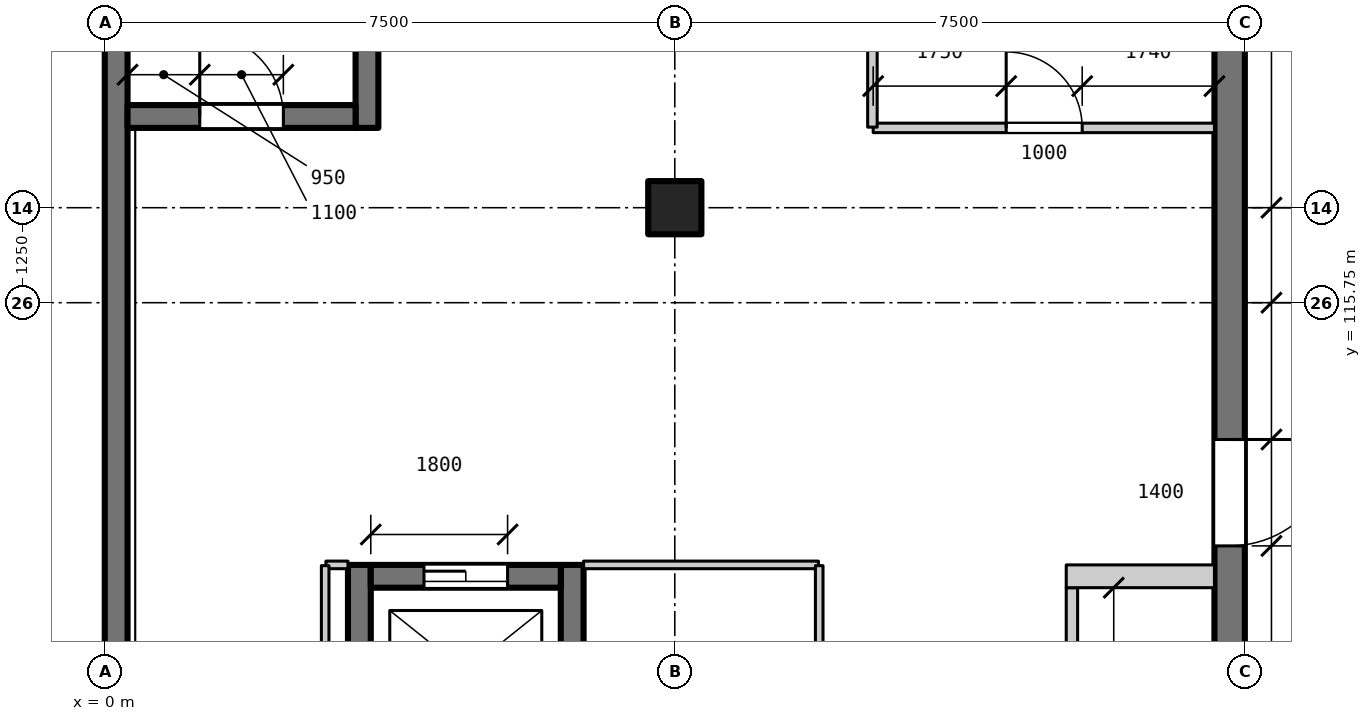
"""IFC4 building model, lengths in metres.
Left out: names, types, materials, properties, quantities, classifications, styles, units other than length and angle.
Written with IfcOpenShell. Run it as: python <this file> out.ifc"""

import sys

from ifc_helpers import new_model, si_unit, direction, frame, frame_2d, origin, origin_2d, place, context, subcontext, project, spatial, rectangle, extrude, element, fill, save


model = new_model("IFC4")
c1 = context("Model", 3, precision=1e-05, world=origin(), true_north=direction((0.0, 1.0)))
c2 = subcontext(c1, "Body", "Model", "MODEL_VIEW")
j1 = project(units=[si_unit("LENGTHUNIT", "METRE"), si_unit("PLANEANGLEUNIT", "RADIAN")], contexts=[c1])
p1 = place(None, origin())
s1 = spatial("IfcSite", under=j1, at=p1, CompositionType="ELEMENT")
p2 = place(p1, origin())
s2 = spatial("IfcBuilding", under=s1, at=p2, CompositionType="ELEMENT")
p3 = place(p2, origin())
s3 = spatial("IfcBuildingStorey", under=s2, at=p3, CompositionType="ELEMENT", Elevation=0.0)
p4 = place(p3, frame((7.5, 117.0, 0.0), z_axis=(0.0, 0.0, 1.0), x_axis=(1.0, 0.0, 0.0)))
e1 = element("IfcColumn", 1, at=p4, inside=s3, PredefinedType="COLUMN", context=c2, shape_type="SweptSolid", body=[
    extrude(rectangle(XDim=0.7, YDim=0.7, at=origin_2d()), origin(), (0.0, 0.0, 1.0), 6.0),
])
p5 = place(p3, frame((0.15, 18.0, 0.0), z_axis=(0.0, 0.0, 1.0), x_axis=(0.0, 1.0, 0.0)))
e2 = element("IfcWall", 2, at=p5, inside=s3, PredefinedType="SHEAR", context=c2, shape_type="SweptSolid", body=[
    extrude(rectangle(XDim=108.0, YDim=0.3, at=frame_2d((54.0, 0.0))), origin(), (0.0, 0.0, 1.0), 6.0),
])
p6 = place(p3, frame((14.8, 99.0, 0.0), z_axis=(0.0, 0.0, 1.0), x_axis=(0.0, 1.0, 0.0)))
e3 = element("IfcWall", 3, at=p6, inside=s3, PredefinedType="SHEAR", context=c2, shape_type="SweptSolid", body=[
    extrude(rectangle(XDim=26.55, YDim=0.4, at=frame_2d((13.275, 0.0))), origin(), (0.0, 0.0, 1.0), 6.0),
])
p7 = place(p6, frame((13.55, 0.0, 0.0)))
e4 = element("IfcOpeningElement", 4, at=p7, cuts=e3, PredefinedType="OPENING", context=c2, shape_type="SweptSolid", body=[
    extrude(rectangle(XDim=1.4, YDim=2.4, at=frame_2d((0.7, 1.2))), frame((0.0, 0.21, 0.0), z_axis=(0.0, -1.0, 0.0), x_axis=(1.0, 0.0, 0.0)), (0.0, 0.0, 1.0), 0.42),
])
p8 = place(p3, frame((3.45, 118.05, 0.0), z_axis=(0.0, 0.0, 1.0), x_axis=(0.0, 1.0, 0.0)))
e5 = element("IfcWall", 5, at=p8, inside=s3, PredefinedType="SHEAR", context=c2, shape_type="SweptSolid", body=[
    extrude(rectangle(XDim=7.5, YDim=0.3, at=frame_2d((3.75, 0.0))), origin(), (0.0, 0.0, 1.0), 6.0),
])
p9 = place(p3, frame((0.3, 118.2, 0.0), z_axis=(0.0, 0.0, 1.0), x_axis=(1.0, 0.0, 0.0)))
e6 = element("IfcWall", 6, at=p9, inside=s3, PredefinedType="SHEAR", context=c2, shape_type="SweptSolid", body=[
    extrude(rectangle(XDim=3.0, YDim=0.3, at=frame_2d((1.5, 0.0))), origin(), (0.0, 0.0, 1.0), 6.0),
])
p10 = place(p9, frame((0.95, 0.0, 0.0)))
e7 = element("IfcOpeningElement", 7, at=p10, cuts=e6, PredefinedType="OPENING", context=c2, shape_type="SweptSolid", body=[
    extrude(rectangle(XDim=1.1, YDim=2.1, at=frame_2d((0.55, 1.05))), frame((0.0, 0.16, 0.0), z_axis=(0.0, -1.0, 0.0), x_axis=(1.0, 0.0, 0.0)), (0.0, 0.0, 1.0), 0.32),
])
for number, where, z_axis, x_axis in (
    (8, (3.35, 109.5, 0.0), (0.0, 0.0, 1.0), (0.0, 1.0, 0.0)),
    (9, (6.15, 109.5, 0.0), (0.0, 0.0, 1.0), (0.0, 1.0, 0.0)),
):
    element("IfcWall", number, at=place(p3, frame(where, z_axis=z_axis, x_axis=x_axis)), inside=s3, PredefinedType="SHEAR", context=c2, shape_type="SweptSolid", body=[
        extrude(rectangle(XDim=2.8, YDim=0.3, at=frame_2d((1.4, 0.0))), origin(), (0.0, 0.0, 1.0), 6.0),
    ])
p11 = place(p3, frame((3.5, 112.15, 0.0), z_axis=(0.0, 0.0, 1.0), x_axis=(1.0, 0.0, 0.0)))
e10 = element("IfcWall", 10, at=p11, inside=s3, PredefinedType="SHEAR", context=c2, shape_type="SweptSolid", body=[
    extrude(rectangle(XDim=2.5, YDim=0.3, at=frame_2d((1.25, 0.0))), origin(), (0.0, 0.0, 1.0), 6.0),
])
p12 = place(p11, frame((0.7, 0.0, 0.0)))
e11 = element("IfcOpeningElement", 11, at=p12, cuts=e10, PredefinedType="OPENING", context=c2, shape_type="SweptSolid", body=[
    extrude(rectangle(XDim=1.1, YDim=2.1, at=frame_2d((0.55, 1.05))), frame((0.0, 0.16, 0.0), z_axis=(0.0, -1.0, 0.0), x_axis=(1.0, 0.0, 0.0)), (0.0, 0.0, 1.0), 0.32),
])
p13 = place(p3, frame((12.725, 108.4, 0.0), z_axis=(0.0, 0.0, 1.0), x_axis=(0.0, 1.0, 0.0)))
e12 = element("IfcWall", 12, at=p13, inside=s3, PredefinedType="PARTITIONING", context=c2, shape_type="SweptSolid", body=[
    extrude(rectangle(XDim=3.6, YDim=0.15, at=frame_2d((1.8, 0.0))), origin(), (0.0, 0.0, 1.0), 5.7),
])
p14 = place(p13, frame((1.35, 0.0, 0.0)))
e13 = element("IfcOpeningElement", 13, at=p14, cuts=e12, PredefinedType="OPENING", context=c2, shape_type="SweptSolid", body=[
    extrude(rectangle(XDim=0.9, YDim=2.1, at=frame_2d((0.45, 1.05))), frame((0.0, 0.085, 0.0), z_axis=(0.0, -1.0, 0.0), x_axis=(1.0, 0.0, 0.0)), (0.0, 0.0, 1.0), 0.17),
])
p15 = place(p3, frame((12.65, 112.15, 0.0), z_axis=(0.0, 0.0, 1.0), x_axis=(1.0, 0.0, 0.0)))
e14 = element("IfcWall", 14, at=p15, inside=s3, PredefinedType="PARTITIONING", context=c2, shape_type="SweptSolid", body=[
    extrude(rectangle(XDim=1.95, YDim=0.3, at=frame_2d((0.975, 0.0))), origin(), (0.0, 0.0, 1.0), 5.7),
])
p16 = place(p3, frame((2.91, 112.3, 0.0), z_axis=(0.0, 0.0, 1.0), x_axis=(1.0, 0.0, 0.0)))
e15 = element("IfcWall", 15, at=p16, inside=s3, PredefinedType="PARTITIONING", context=c2, shape_type="SweptSolid", body=[
    extrude(rectangle(XDim=0.29, YDim=0.1, at=frame_2d((0.145, 0.0))), origin(), (0.0, 0.0, 1.0), 5.7),
])
p17 = place(p3, frame((6.3, 112.3, 0.0), z_axis=(0.0, 0.0, 1.0), x_axis=(1.0, 0.0, 0.0)))
e16 = element("IfcWall", 16, at=p17, inside=s3, PredefinedType="PARTITIONING", context=c2, shape_type="SweptSolid", body=[
    extrude(rectangle(XDim=3.09, YDim=0.1, at=frame_2d((1.545, 0.0))), origin(), (0.0, 0.0, 1.0), 5.7),
])
p18 = place(p3, frame((10.11, 118.05, 0.0), z_axis=(0.0, 0.0, 1.0), x_axis=(1.0, 0.0, 0.0)))
e17 = element("IfcWall", 17, at=p18, inside=s3, PredefinedType="PARTITIONING", context=c2, shape_type="SweptSolid", body=[
    extrude(rectangle(XDim=4.49, YDim=0.125, at=frame_2d((2.245, 0.0))), origin(), (0.0, 0.0, 1.0), 5.7),
])
p19 = place(p18, frame((1.75, 0.0, 0.0)))
e18 = element("IfcOpeningElement", 18, at=p19, cuts=e17, PredefinedType="OPENING", context=c2, shape_type="SweptSolid", body=[
    extrude(rectangle(XDim=1.0, YDim=2.1, at=frame_2d((0.5, 1.05))), frame((0.0, 0.073, 0.0), z_axis=(0.0, -1.0, 0.0), x_axis=(1.0, 0.0, 0.0)), (0.0, 0.0, 1.0), 0.145),
])
p20 = place(p3, frame((2.9, 108.9, 0.0), z_axis=(0.0, 0.0, 1.0), x_axis=(0.0, 1.0, 0.0)))
e19 = element("IfcWall", 19, at=p20, inside=s3, PredefinedType="PARTITIONING", context=c2, shape_type="SweptSolid", body=[
    extrude(rectangle(XDim=3.39, YDim=0.1, at=frame_2d((1.695, 0.0))), origin(), (0.0, 0.0, 1.0), 5.7),
])
p21 = place(p3, frame((9.4, 108.962, 0.0), z_axis=(0.0, 0.0, 1.0), x_axis=(0.0, 1.0, 0.0)))
e20 = element("IfcWall", 20, at=p21, inside=s3, PredefinedType="PARTITIONING", context=c2, shape_type="SweptSolid", body=[
    extrude(rectangle(XDim=3.328, YDim=0.1, at=frame_2d((1.664, 0.0))), origin(), (0.0, 0.0, 1.0), 5.7),
])
p22 = place(p3, frame((10.1, 118.06, 0.0), z_axis=(0.0, 0.0, 1.0), x_axis=(0.0, 1.0, 0.0)))
e21 = element("IfcWall", 21, at=p22, inside=s3, PredefinedType="PARTITIONING", context=c2, shape_type="SweptSolid", body=[
    extrude(rectangle(XDim=7.49, YDim=0.125, at=frame_2d((3.745, 0.0))), origin(), (0.0, 0.0, 1.0), 5.7),
])
p23 = place(p7, frame((1.4, 0.0, 0.0), z_axis=(0.0, 0.0, 1.0), x_axis=(-1.0, 0.0, 0.0)))
e22 = element("IfcDoor", 22, at=p23, inside=s3, OperationType="SINGLE_SWING_LEFT", PredefinedType="DOOR", context=c2, shape_type="SweptSolid", body=[
    extrude(rectangle(XDim=1.4, YDim=2.4, at=frame_2d((0.7, 1.2))), frame((0.0, 0.025, 0.0), z_axis=(0.0, -1.0, 0.0), x_axis=(1.0, 0.0, 0.0)), (0.0, 0.0, 1.0), 0.05),
])
fill(e4, e22)
p24 = place(p19, origin())
e23 = element("IfcDoor", 23, at=p24, inside=s3, OperationType="SINGLE_SWING_LEFT", PredefinedType="DOOR", context=c2, shape_type="SweptSolid", body=[
    extrude(rectangle(XDim=1.0, YDim=2.1, at=frame_2d((0.5, 1.05))), frame((0.0, 0.025, 0.0), z_axis=(0.0, -1.0, 0.0), x_axis=(1.0, 0.0, 0.0)), (0.0, 0.0, 1.0), 0.05),
])
fill(e18, e23)
p25 = place(p10, origin())
e24 = element("IfcDoor", 24, at=p25, inside=s3, OperationType="SINGLE_SWING_LEFT", PredefinedType="DOOR", context=c2, shape_type="SweptSolid", body=[
    extrude(rectangle(XDim=1.1, YDim=2.1, at=frame_2d((0.55, 1.05))), frame((0.0, 0.025, 0.0), z_axis=(0.0, -1.0, 0.0), x_axis=(1.0, 0.0, 0.0)), (0.0, 0.0, 1.0), 0.05),
])
fill(e7, e24)
p26 = place(p12, origin())
e25 = element("IfcDoor", 25, at=p26, inside=s3, OperationType="SLIDING_TO_LEFT", PredefinedType="DOOR", context=c2, shape_type="SweptSolid", body=[
    extrude(rectangle(XDim=1.1, YDim=2.1, at=frame_2d((0.55, 1.05))), frame((0.0, 0.025, 0.0), z_axis=(0.0, -1.0, 0.0), x_axis=(1.0, 0.0, 0.0)), (0.0, 0.0, 1.0), 0.05),
])
fill(e11, e25)
save(model, sys.argv[1])
